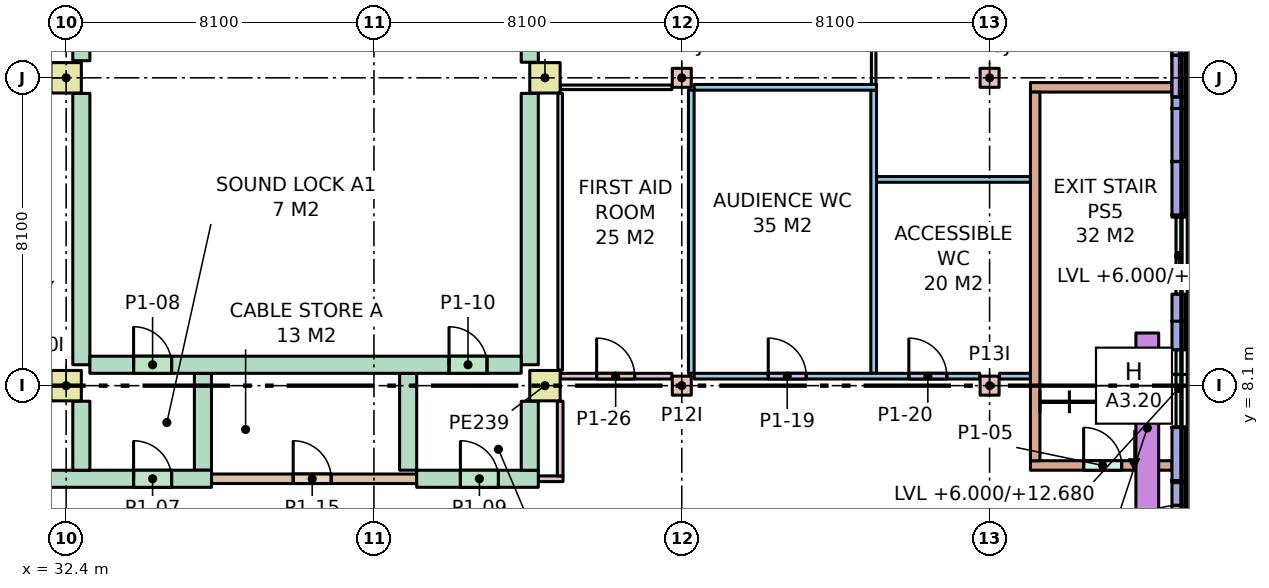
"""IFC4 building model, lengths in metres.
Left out: names, types, materials, properties, quantities, classifications, styles, units other than length and angle.
Written with IfcOpenShell. Run it as: python <this file> out.ifc"""

import sys

from ifc_helpers import new_model, si_unit, direction, frame, frame_2d, origin, origin_2d, place, context, subcontext, project, spatial, rectangle, extrude, element, fill, save


model = new_model("IFC4")
c1 = context("Model", 3, precision=1e-05, world=origin(), true_north=direction((0.0, 1.0)))
c2 = subcontext(c1, "Body", "Model", "MODEL_VIEW")
j1 = project(units=[si_unit("LENGTHUNIT", "METRE"), si_unit("PLANEANGLEUNIT", "RADIAN")], contexts=[c1])
p1 = place(None, origin())
s1 = spatial("IfcSite", under=j1, at=p1, CompositionType="ELEMENT")
p2 = place(p1, origin())
s2 = spatial("IfcBuilding", under=s1, at=p2, CompositionType="ELEMENT")
p3 = place(p2, frame((0.0, 0.0, 6.0)))
s3 = spatial("IfcBuildingStorey", under=s2, at=p3, CompositionType="ELEMENT", Elevation=6.0)
for number, where, z_axis, x_axis in (
    (1, (32.4, 8.1, 0.0), (0.0, 0.0, 1.0), (1.0, 0.0, 0.0)),
    (2, (32.4, 16.2, 0.0), (0.0, 0.0, 1.0), (1.0, 0.0, 0.0)),
):
    element("IfcColumn", number, at=place(p3, frame(where, z_axis=z_axis, x_axis=x_axis)), inside=s3, PredefinedType="COLUMN", context=c2, shape_type="SweptSolid", body=[
        extrude(rectangle(XDim=0.8, YDim=0.8, at=origin_2d()), origin(), (0.0, 0.0, 1.0), 7.0),
    ])
for number, where, z_axis, x_axis in (
    (3, (48.6, 8.1, 0.0), (0.0, 0.0, 1.0), (1.0, 0.0, 0.0)),
    (4, (48.6, 16.2, 0.0), (0.0, 0.0, 1.0), (1.0, 0.0, 0.0)),
    (5, (56.7, 8.1, 0.0), (0.0, 0.0, 1.0), (1.0, 0.0, 0.0)),
    (6, (56.7, 16.2, 0.0), (0.0, 0.0, 1.0), (1.0, 0.0, 0.0)),
):
    element("IfcColumn", number, at=place(p3, frame(where, z_axis=z_axis, x_axis=x_axis)), inside=s3, PredefinedType="COLUMN", context=c2, shape_type="SweptSolid", body=[
        extrude(rectangle(XDim=0.5, YDim=0.5, at=origin_2d()), origin(), (0.0, 0.0, 1.0), 7.0),
    ])
for number, where, z_axis, x_axis in (
    (7, (45.0, 8.1, 0.0), (0.0, 0.0, 1.0), (1.0, 0.0, 0.0)),
    (8, (45.0, 16.2, 0.0), (0.0, 0.0, 1.0), (1.0, 0.0, 0.0)),
):
    element("IfcColumn", number, at=place(p3, frame(where, z_axis=z_axis, x_axis=x_axis)), inside=s3, PredefinedType="COLUMN", context=c2, shape_type="SweptSolid", body=[
        extrude(rectangle(XDim=0.8, YDim=0.8, at=origin_2d()), origin(), (0.0, 0.0, 1.0), 7.0),
    ])
p4 = place(p3, frame((61.675, 2.55, 0.0), z_axis=(0.0, 0.0, 1.0), x_axis=(0.0, 1.0, 0.0)))
e9 = element("IfcWall", 9, at=p4, inside=s3, PredefinedType="STANDARD", context=c2, shape_type="SweptSolid", body=[
    extrude(rectangle(XDim=3.0, YDim=0.35, at=frame_2d((1.5, 0.0))), origin(), (0.0, 0.0, 1.0), 6.68),
])
p5 = place(p4, frame((0.6, 0.0, 0.0)))
e10 = element("IfcOpeningElement", 10, at=p5, cuts=e9, PredefinedType="OPENING", context=c2, shape_type="SweptSolid", body=[
    extrude(rectangle(XDim=1.8, YDim=2.7, at=frame_2d((0.9, 1.35))), frame((0.0, 0.185, 0.0), z_axis=(0.0, -1.0, 0.0), x_axis=(1.0, 0.0, 0.0)), (0.0, 0.0, 1.0), 0.37),
])
for number, where, z_axis, x_axis in (
    (11, (61.675, 5.55, 0.0), (0.0, 0.0, 1.0), (0.0, 1.0, 0.0)),
    (12, (61.675, 9.042, 0.0), (0.0, 0.0, 1.0), (0.0, 1.0, 0.0)),
):
    element("IfcWall", number, at=place(p3, frame(where, z_axis=z_axis, x_axis=x_axis)), inside=s3, PredefinedType="STANDARD", context=c2, shape_type="SweptSolid", body=[
        extrude(rectangle(XDim=1.467, YDim=0.35, at=frame_2d((0.733, 0.0))), origin(), (0.0, 0.0, 1.0), 6.68),
    ])
p6 = place(p3, frame((61.675, 12.533, 0.0), z_axis=(0.0, 0.0, 1.0), x_axis=(0.0, 1.0, 0.0)))
e13 = element("IfcWall", 13, at=p6, inside=s3, PredefinedType="STANDARD", context=c2, shape_type="SweptSolid", body=[
    extrude(rectangle(XDim=1.467, YDim=0.35, at=frame_2d((0.733, 0.0))), origin(), (0.0, 0.0, 1.0), 6.68),
])
p7 = place(p3, frame((61.675, 14.0, 0.0), z_axis=(0.0, 0.0, 1.0), x_axis=(0.0, 1.0, 0.0)))
e14 = element("IfcWall", 14, at=p7, inside=s3, PredefinedType="STANDARD", context=c2, shape_type="SweptSolid", body=[
    extrude(rectangle(XDim=6.992, YDim=0.35, at=frame_2d((3.496, 0.0))), origin(), (0.0, 0.0, 1.0), 6.68),
])
p8 = place(p7, frame((1.696, 0.0, 1.0)))
e15 = element("IfcOpeningElement", 15, at=p8, cuts=e14, PredefinedType="OPENING", context=c2, shape_type="SweptSolid", body=[
    extrude(rectangle(XDim=3.6, YDim=4.0, at=frame_2d((1.8, 2.0))), frame((0.0, 0.185, 0.0), z_axis=(0.0, -1.0, 0.0), x_axis=(1.0, 0.0, 0.0)), (0.0, 0.0, 1.0), 0.37),
])
p9 = place(p3, frame((60.85, 4.486, 7.0), z_axis=(0.0, 0.0, 1.0), x_axis=(0.0, 1.0, 0.0)))
e16 = element("IfcWall", 16, at=p9, inside=s3, PredefinedType="PARAPET", context=c2, shape_type="SweptSolid", body=[
    extrude(rectangle(XDim=5.0, YDim=0.6, at=frame_2d((2.5, 0.0))), origin(), (0.0, 0.0, 1.0), 0.9),
])
for number, where, z_axis, x_axis in (
    (17, (53.65, 8.425, 0.0), (0.0, 0.0, 1.0), (0.0, 1.0, 0.0)),
    (18, (48.85, 8.425, 0.0), (0.0, 0.0, 1.0), (0.0, 1.0, 0.0)),
):
    element("IfcWall", number, at=place(p3, frame(where, z_axis=z_axis, x_axis=x_axis)), inside=s3, PredefinedType="PARTITIONING", context=c2, shape_type="SweptSolid", body=[
        extrude(rectangle(XDim=7.45, YDim=0.15, at=frame_2d((3.725, 0.0))), origin(), (0.0, 0.0, 1.0), 6.68),
    ])
p10 = place(p3, frame((48.925, 15.95, 0.0), z_axis=(0.0, 0.0, 1.0), x_axis=(1.0, 0.0, 0.0)))
e19 = element("IfcWall", 19, at=p10, inside=s3, PredefinedType="PARTITIONING", context=c2, shape_type="SweptSolid", body=[
    extrude(rectangle(XDim=4.8, YDim=0.15, at=frame_2d((2.4, 0.0))), origin(), (0.0, 0.0, 1.0), 6.68),
])
p11 = place(p3, frame((48.925, 8.35, 0.0), z_axis=(0.0, 0.0, 1.0), x_axis=(1.0, 0.0, 0.0)))
e20 = element("IfcWall", 20, at=p11, inside=s3, PredefinedType="PARTITIONING", context=c2, shape_type="SweptSolid", body=[
    extrude(rectangle(XDim=7.515, YDim=0.15, at=frame_2d((3.757, 0.0))), origin(), (0.0, 0.0, 1.0), 6.68),
])
p12 = place(p11, frame((1.95, 0.0, 0.0)))
e21 = element("IfcOpeningElement", 21, at=p12, cuts=e20, PredefinedType="OPENING", context=c2, shape_type="SweptSolid", body=[
    extrude(rectangle(XDim=1.0, YDim=2.1, at=frame_2d((0.5, 1.05))), frame((0.0, 0.085, 0.0), z_axis=(0.0, -1.0, 0.0), x_axis=(1.0, 0.0, 0.0)), (0.0, 0.0, 1.0), 0.17),
])
p13 = place(p11, frame((5.65, 0.0, 0.0)))
e22 = element("IfcOpeningElement", 22, at=p13, cuts=e20, PredefinedType="OPENING", context=c2, shape_type="SweptSolid", body=[
    extrude(rectangle(XDim=1.0, YDim=2.1, at=frame_2d((0.5, 1.05))), frame((0.0, 0.085, 0.0), z_axis=(0.0, -1.0, 0.0), x_axis=(1.0, 0.0, 0.0)), (0.0, 0.0, 1.0), 0.17),
])
p14 = place(p3, frame((53.725, 13.527, 0.0), z_axis=(0.0, 0.0, 1.0), x_axis=(1.0, 0.0, 0.0)))
e23 = element("IfcWall", 23, at=p14, inside=s3, PredefinedType="PARTITIONING", context=c2, shape_type="SweptSolid", body=[
    extrude(rectangle(XDim=4.05, YDim=0.15, at=frame_2d((2.025, 0.0))), origin(), (0.0, 0.0, 1.0), 6.68),
])
p15 = place(p3, frame((56.96, 8.35, 0.0), z_axis=(0.0, 0.0, 1.0), x_axis=(1.0, 0.0, 0.0)))
e24 = element("IfcWall", 24, at=p15, inside=s3, PredefinedType="PARTITIONING", context=c2, shape_type="SweptSolid", body=[
    extrude(rectangle(XDim=0.815, YDim=0.15, at=frame_2d((0.407, 0.0))), origin(), (0.0, 0.0, 1.0), 6.68),
])
p16 = place(p3, frame((53.65, 16.025, 0.0), z_axis=(0.0, 0.0, 1.0), x_axis=(0.0, 1.0, 0.0)))
e25 = element("IfcWall", 25, at=p16, inside=s3, PredefinedType="PARTITIONING", context=c2, shape_type="SweptSolid", body=[
    extrude(rectangle(XDim=18.55, YDim=0.12, at=frame_2d((9.275, 0.0))), origin(), (0.0, 0.0, 1.0), 6.68),
])
p17 = place(p3, frame((57.775, 15.95, 0.0), z_axis=(0.0, 0.0, 1.0), x_axis=(1.0, 0.0, 0.0)))
e26 = element("IfcWall", 26, at=p17, inside=s3, PredefinedType="STANDARD", context=c2, shape_type="SweptSolid", body=[
    extrude(rectangle(XDim=3.725, YDim=0.25, at=frame_2d((1.863, 0.0))), origin(), (0.0, 0.0, 1.0), 6.68),
])
p18 = place(p3, frame((36.225, 5.65, 0.0), z_axis=(0.0, 0.0, 1.0), x_axis=(1.0, 0.0, 0.0)))
e27 = element("IfcWall", 27, at=p18, inside=s3, PredefinedType="PARTITIONING", context=c2, shape_type="SweptSolid", body=[
    extrude(rectangle(XDim=5.4, YDim=0.25, at=frame_2d((2.7, 0.0))), origin(), (0.0, 0.0, 1.0), 6.68),
])
p19 = place(p18, frame((2.15, 0.0, 0.0)))
e28 = element("IfcOpeningElement", 28, at=p19, cuts=e27, PredefinedType="OPENING", context=c2, shape_type="SweptSolid", body=[
    extrude(rectangle(XDim=1.0, YDim=2.1, at=frame_2d((0.5, 1.05))), frame((0.0, 0.135, 0.0), z_axis=(0.0, -1.0, 0.0), x_axis=(1.0, 0.0, 0.0)), (0.0, 0.0, 1.0), 0.27),
])
for number, where, z_axis, x_axis in (
    (29, (36.0, 5.875, 0.0), (0.0, 0.0, 1.0), (0.0, 1.0, 0.0)),
    (30, (41.4, 5.875, 0.0), (0.0, 0.0, 1.0), (0.0, 1.0, 0.0)),
):
    element("IfcWall", number, at=place(p3, frame(where, z_axis=z_axis, x_axis=x_axis)), inside=s3, PredefinedType="PARTITIONING", context=c2, shape_type="SweptSolid", body=[
        extrude(rectangle(XDim=2.55, YDim=0.45, at=frame_2d((1.275, 0.0))), origin(), (0.0, 0.0, 1.0), 6.68),
    ])
p20 = place(p3, frame((24.525, 5.65, 0.0), z_axis=(0.0, 0.0, 1.0), x_axis=(1.0, 0.0, 0.0)))
e31 = element("IfcWall", 31, at=p20, inside=s3, PredefinedType="PARTITIONING", context=c2, shape_type="SweptSolid", body=[
    extrude(rectangle(XDim=11.7, YDim=0.45, at=frame_2d((5.85, 0.0))), origin(), (0.0, 0.0, 1.0), 6.68),
])
p21 = place(p20, frame((9.65, 0.0, 0.0)))
e32 = element("IfcOpeningElement", 32, at=p21, cuts=e31, PredefinedType="OPENING", context=c2, shape_type="SweptSolid", body=[
    extrude(rectangle(XDim=1.0, YDim=2.1, at=frame_2d((0.5, 1.05))), frame((0.0, 0.235, 0.0), z_axis=(0.0, -1.0, 0.0), x_axis=(1.0, 0.0, 0.0)), (0.0, 0.0, 1.0), 0.47),
])
p22 = place(p20, frame((3.75, 0.0, 0.0)))
e33 = element("IfcOpeningElement", 33, at=p22, cuts=e31, PredefinedType="OPENING", context=c2, shape_type="SweptSolid", body=[
    extrude(rectangle(XDim=1.0, YDim=2.1, at=frame_2d((0.5, 1.05))), frame((0.0, 0.235, 0.0), z_axis=(0.0, -1.0, 0.0), x_axis=(1.0, 0.0, 0.0)), (0.0, 0.0, 1.0), 0.47),
])
p23 = place(p3, frame((32.8, 5.875, 0.0), z_axis=(0.0, 0.0, 1.0), x_axis=(0.0, 1.0, 0.0)))
e34 = element("IfcWall", 34, at=p23, inside=s3, PredefinedType="PARTITIONING", context=c2, shape_type="SweptSolid", body=[
    extrude(rectangle(XDim=1.815, YDim=0.45, at=frame_2d((0.907, 0.0))), origin(), (0.0, 0.0, 1.0), 6.68),
])
p24 = place(p3, frame((32.8, 8.65, 0.0), z_axis=(0.0, 0.0, 1.0), x_axis=(0.0, 1.0, 0.0)))
e35 = element("IfcWall", 35, at=p24, inside=s3, PredefinedType="PARTITIONING", context=c2, shape_type="SweptSolid", body=[
    extrude(rectangle(XDim=7.14, YDim=0.45, at=frame_2d((3.57, 0.0))), origin(), (0.0, 0.0, 1.0), 6.68),
])
p25 = place(p3, frame((44.825, 5.65, 0.0), z_axis=(0.0, 0.0, 1.0), x_axis=(1.0, 0.0, 0.0)))
e36 = element("IfcWall", 36, at=p25, inside=s3, PredefinedType="PARTITIONING", context=c2, shape_type="SweptSolid", body=[
    extrude(rectangle(XDim=0.65, YDim=0.15, at=frame_2d((0.325, 0.0))), origin(), (0.0, 0.0, 1.0), 6.68),
])
p26 = place(p3, frame((41.625, 5.65, 0.0), z_axis=(0.0, 0.0, 1.0), x_axis=(1.0, 0.0, 0.0)))
e37 = element("IfcWall", 37, at=p26, inside=s3, PredefinedType="PARTITIONING", context=c2, shape_type="SweptSolid", body=[
    extrude(rectangle(XDim=3.2, YDim=0.45, at=frame_2d((1.6, 0.0))), origin(), (0.0, 0.0, 1.0), 6.68),
])
p27 = place(p26, frame((1.15, 0.0, 0.0)))
e38 = element("IfcOpeningElement", 38, at=p27, cuts=e37, PredefinedType="OPENING", context=c2, shape_type="SweptSolid", body=[
    extrude(rectangle(XDim=1.0, YDim=2.1, at=frame_2d((0.5, 1.05))), frame((0.0, 0.235, 0.0), z_axis=(0.0, -1.0, 0.0), x_axis=(1.0, 0.0, 0.0)), (0.0, 0.0, 1.0), 0.47),
])
p28 = place(p3, frame((45.41, 15.95, 0.0), z_axis=(0.0, 0.0, 1.0), x_axis=(1.0, 0.0, 0.0)))
e39 = element("IfcWall", 39, at=p28, inside=s3, PredefinedType="PARTITIONING", context=c2, shape_type="SweptSolid", body=[
    extrude(rectangle(XDim=2.93, YDim=0.12, at=frame_2d((1.465, 0.0))), origin(), (0.0, 0.0, 1.0), 6.68),
])
p29 = place(p3, frame((45.4, 8.51, 0.0), z_axis=(0.0, 0.0, 1.0), x_axis=(0.0, 1.0, 0.0)))
e40 = element("IfcWall", 40, at=p29, inside=s3, PredefinedType="PARTITIONING", context=c2, shape_type="SweptSolid", body=[
    extrude(rectangle(XDim=7.28, YDim=0.12, at=frame_2d((3.64, 0.0))), origin(), (0.0, 0.0, 1.0), 6.68),
])
p30 = place(p3, frame((45.41, 8.35, 0.0), z_axis=(0.0, 0.0, 1.0), x_axis=(1.0, 0.0, 0.0)))
e41 = element("IfcWall", 41, at=p30, inside=s3, PredefinedType="PARTITIONING", context=c2, shape_type="SweptSolid", body=[
    extrude(rectangle(XDim=2.93, YDim=0.15, at=frame_2d((1.465, 0.0))), origin(), (0.0, 0.0, 1.0), 6.68),
])
p31 = place(p30, frame((0.95, 0.0, 0.0)))
e42 = element("IfcOpeningElement", 42, at=p31, cuts=e41, PredefinedType="OPENING", context=c2, shape_type="SweptSolid", body=[
    extrude(rectangle(XDim=1.0, YDim=2.1, at=frame_2d((0.5, 1.05))), frame((0.0, 0.085, 0.0), z_axis=(0.0, -1.0, 0.0), x_axis=(1.0, 0.0, 0.0)), (0.0, 0.0, 1.0), 0.17),
])
p32 = place(p3, frame((44.6, 5.875, 0.0), z_axis=(0.0, 0.0, 1.0), x_axis=(0.0, 1.0, 0.0)))
e43 = element("IfcWall", 43, at=p32, inside=s3, PredefinedType="PARTITIONING", context=c2, shape_type="SweptSolid", body=[
    extrude(rectangle(XDim=1.815, YDim=0.45, at=frame_2d((0.907, 0.0))), origin(), (0.0, 0.0, 1.0), 6.68),
])
p33 = place(p3, frame((45.4, 5.725, 0.0), z_axis=(0.0, 0.0, 1.0), x_axis=(0.0, 1.0, 0.0)))
e44 = element("IfcWall", 44, at=p33, inside=s3, PredefinedType="PARTITIONING", context=c2, shape_type="SweptSolid", body=[
    extrude(rectangle(XDim=1.965, YDim=0.15, at=frame_2d((0.982, 0.0))), origin(), (0.0, 0.0, 1.0), 6.68),
])
p34 = place(p3, frame((44.6, 8.65, 0.0), z_axis=(0.0, 0.0, 1.0), x_axis=(0.0, 1.0, 0.0)))
e45 = element("IfcWall", 45, at=p34, inside=s3, PredefinedType="PARTITIONING", context=c2, shape_type="SweptSolid", body=[
    extrude(rectangle(XDim=7.14, YDim=0.45, at=frame_2d((3.57, 0.0))), origin(), (0.0, 0.0, 1.0), 6.68),
])
p35 = place(p3, frame((44.6, 16.61, 0.0), z_axis=(0.0, 0.0, 1.0), x_axis=(0.0, 1.0, 0.0)))
e46 = element("IfcWall", 46, at=p35, inside=s3, PredefinedType="PARTITIONING", context=c2, shape_type="SweptSolid", body=[
    extrude(rectangle(XDim=7.28, YDim=0.45, at=frame_2d((3.64, 0.0))), origin(), (0.0, 0.0, 1.0), 6.68),
])
p36 = place(p3, frame((33.025, 8.65, 0.0), z_axis=(0.0, 0.0, 1.0), x_axis=(1.0, 0.0, 0.0)))
e47 = element("IfcWall", 47, at=p36, inside=s3, PredefinedType="PARTITIONING", context=c2, shape_type="SweptSolid", body=[
    extrude(rectangle(XDim=11.35, YDim=0.45, at=frame_2d((5.675, 0.0))), origin(), (0.0, 0.0, 1.0), 6.68),
])
p37 = place(p36, frame((1.15, 0.0, 0.0)))
e48 = element("IfcOpeningElement", 48, at=p37, cuts=e47, PredefinedType="OPENING", context=c2, shape_type="SweptSolid", body=[
    extrude(rectangle(XDim=1.0, YDim=2.1, at=frame_2d((0.5, 1.05))), frame((0.0, 0.235, 0.0), z_axis=(0.0, -1.0, 0.0), x_axis=(1.0, 0.0, 0.0)), (0.0, 0.0, 1.0), 0.47),
])
p38 = place(p36, frame((9.45, 0.0, 0.0)))
e49 = element("IfcOpeningElement", 49, at=p38, cuts=e47, PredefinedType="OPENING", context=c2, shape_type="SweptSolid", body=[
    extrude(rectangle(XDim=1.0, YDim=2.1, at=frame_2d((0.5, 1.05))), frame((0.0, 0.235, 0.0), z_axis=(0.0, -1.0, 0.0), x_axis=(1.0, 0.0, 0.0)), (0.0, 0.0, 1.0), 0.47),
])
p39 = place(p3, frame((57.775, 6.0, 0.0), z_axis=(0.0, 0.0, 1.0), x_axis=(1.0, 0.0, 0.0)))
e50 = element("IfcWall", 50, at=p39, inside=s3, PredefinedType="STANDARD", context=c2, shape_type="SweptSolid", body=[
    extrude(rectangle(XDim=3.725, YDim=0.25, at=frame_2d((1.863, 0.0))), origin(), (0.0, 0.0, 1.0), 6.68),
])
p40 = place(p39, frame((1.4, 0.0, 0.0)))
e51 = element("IfcOpeningElement", 51, at=p40, cuts=e50, PredefinedType="OPENING", context=c2, shape_type="SweptSolid", body=[
    extrude(rectangle(XDim=1.0, YDim=2.1, at=frame_2d((0.5, 1.05))), frame((0.0, 0.135, 0.0), z_axis=(0.0, -1.0, 0.0), x_axis=(1.0, 0.0, 0.0)), (0.0, 0.0, 1.0), 0.27),
])
p41 = place(p3, frame((57.9, 6.125, 0.0), z_axis=(0.0, 0.0, 1.0), x_axis=(0.0, 1.0, 0.0)))
e52 = element("IfcWall", 52, at=p41, inside=s3, PredefinedType="STANDARD", context=c2, shape_type="SweptSolid", body=[
    extrude(rectangle(XDim=9.7, YDim=0.25, at=frame_2d((4.85, 0.0))), origin(), (0.0, 0.0, 1.0), 6.68),
])
p42 = place(p3, frame((32.8, 16.65, 0.0), z_axis=(0.0, 0.0, 1.0), x_axis=(0.0, 1.0, 0.0)))
e53 = element("IfcWall", 53, at=p42, inside=s3, PredefinedType="PARTITIONING", context=c2, shape_type="SweptSolid", body=[
    extrude(rectangle(XDim=7.24, YDim=0.45, at=frame_2d((3.62, 0.0))), origin(), (0.0, 0.0, 1.0), 6.68),
])
p43 = place(p8, origin())
e54 = element("IfcWindow", 54, at=p43, inside=s3, PartitioningType="SINGLE_PANEL", PredefinedType="WINDOW", context=c2, shape_type="SweptSolid", body=[
    extrude(rectangle(XDim=3.6, YDim=4.0, at=frame_2d((1.8, 2.0))), frame((0.0, 0.03, 0.0), z_axis=(0.0, -1.0, 0.0), x_axis=(1.0, 0.0, 0.0)), (0.0, 0.0, 1.0), 0.06),
])
fill(e15, e54)
p44 = place(p40, origin())
e55 = element("IfcDoor", 55, at=p44, inside=s3, OperationType="SINGLE_SWING_LEFT", PredefinedType="DOOR", context=c2, shape_type="SweptSolid", body=[
    extrude(rectangle(XDim=1.0, YDim=2.1, at=frame_2d((0.5, 1.05))), frame((0.0, 0.025, 0.0), z_axis=(0.0, -1.0, 0.0), x_axis=(1.0, 0.0, 0.0)), (0.0, 0.0, 1.0), 0.05),
])
fill(e51, e55)
p45 = place(p21, origin())
e56 = element("IfcDoor", 56, at=p45, inside=s3, OperationType="SINGLE_SWING_LEFT", PredefinedType="DOOR", context=c2, shape_type="SweptSolid", body=[
    extrude(rectangle(XDim=1.0, YDim=2.1, at=frame_2d((0.5, 1.05))), frame((0.0, 0.025, 0.0), z_axis=(0.0, -1.0, 0.0), x_axis=(1.0, 0.0, 0.0)), (0.0, 0.0, 1.0), 0.05),
])
fill(e32, e56)
p46 = place(p37, origin())
e57 = element("IfcDoor", 57, at=p46, inside=s3, OperationType="SINGLE_SWING_LEFT", PredefinedType="DOOR", context=c2, shape_type="SweptSolid", body=[
    extrude(rectangle(XDim=1.0, YDim=2.1, at=frame_2d((0.5, 1.05))), frame((0.0, 0.025, 0.0), z_axis=(0.0, -1.0, 0.0), x_axis=(1.0, 0.0, 0.0)), (0.0, 0.0, 1.0), 0.05),
])
fill(e48, e57)
p47 = place(p27, origin())
e58 = element("IfcDoor", 58, at=p47, inside=s3, OperationType="SINGLE_SWING_LEFT", PredefinedType="DOOR", context=c2, shape_type="SweptSolid", body=[
    extrude(rectangle(XDim=1.0, YDim=2.1, at=frame_2d((0.5, 1.05))), frame((0.0, 0.025, 0.0), z_axis=(0.0, -1.0, 0.0), x_axis=(1.0, 0.0, 0.0)), (0.0, 0.0, 1.0), 0.05),
])
fill(e38, e58)
p48 = place(p38, origin())
e59 = element("IfcDoor", 59, at=p48, inside=s3, OperationType="SINGLE_SWING_LEFT", PredefinedType="DOOR", context=c2, shape_type="SweptSolid", body=[
    extrude(rectangle(XDim=1.0, YDim=2.1, at=frame_2d((0.5, 1.05))), frame((0.0, 0.025, 0.0), z_axis=(0.0, -1.0, 0.0), x_axis=(1.0, 0.0, 0.0)), (0.0, 0.0, 1.0), 0.05),
])
fill(e49, e59)
p49 = place(p19, origin())
e60 = element("IfcDoor", 60, at=p49, inside=s3, OperationType="SINGLE_SWING_LEFT", PredefinedType="DOOR", context=c2, shape_type="SweptSolid", body=[
    extrude(rectangle(XDim=1.0, YDim=2.1, at=frame_2d((0.5, 1.05))), frame((0.0, 0.025, 0.0), z_axis=(0.0, -1.0, 0.0), x_axis=(1.0, 0.0, 0.0)), (0.0, 0.0, 1.0), 0.05),
])
fill(e28, e60)
p50 = place(p12, origin())
e61 = element("IfcDoor", 61, at=p50, inside=s3, OperationType="SINGLE_SWING_LEFT", PredefinedType="DOOR", context=c2, shape_type="SweptSolid", body=[
    extrude(rectangle(XDim=1.0, YDim=2.1, at=frame_2d((0.5, 1.05))), frame((0.0, 0.025, 0.0), z_axis=(0.0, -1.0, 0.0), x_axis=(1.0, 0.0, 0.0)), (0.0, 0.0, 1.0), 0.05),
])
fill(e21, e61)
p51 = place(p13, origin())
e62 = element("IfcDoor", 62, at=p51, inside=s3, OperationType="SINGLE_SWING_LEFT", PredefinedType="DOOR", context=c2, shape_type="SweptSolid", body=[
    extrude(rectangle(XDim=1.0, YDim=2.1, at=frame_2d((0.5, 1.05))), frame((0.0, 0.025, 0.0), z_axis=(0.0, -1.0, 0.0), x_axis=(1.0, 0.0, 0.0)), (0.0, 0.0, 1.0), 0.05),
])
fill(e22, e62)
p52 = place(p31, origin())
e63 = element("IfcDoor", 63, at=p52, inside=s3, OperationType="SINGLE_SWING_LEFT", PredefinedType="DOOR", context=c2, shape_type="SweptSolid", body=[
    extrude(rectangle(XDim=1.0, YDim=2.1, at=frame_2d((0.5, 1.05))), frame((0.0, 0.025, 0.0), z_axis=(0.0, -1.0, 0.0), x_axis=(1.0, 0.0, 0.0)), (0.0, 0.0, 1.0), 0.05),
])
fill(e42, e63)
p53 = place(p5, origin())
e64 = element("IfcDoor", 64, at=p53, inside=s3, OperationType="SINGLE_SWING_LEFT", PredefinedType="DOOR", context=c2, shape_type="SweptSolid", body=[
    extrude(rectangle(XDim=1.8, YDim=2.7, at=frame_2d((0.9, 1.35))), frame((0.0, 0.025, 0.0), z_axis=(0.0, -1.0, 0.0), x_axis=(1.0, 0.0, 0.0)), (0.0, 0.0, 1.0), 0.05),
])
fill(e10, e64)
save(model, sys.argv[1])
